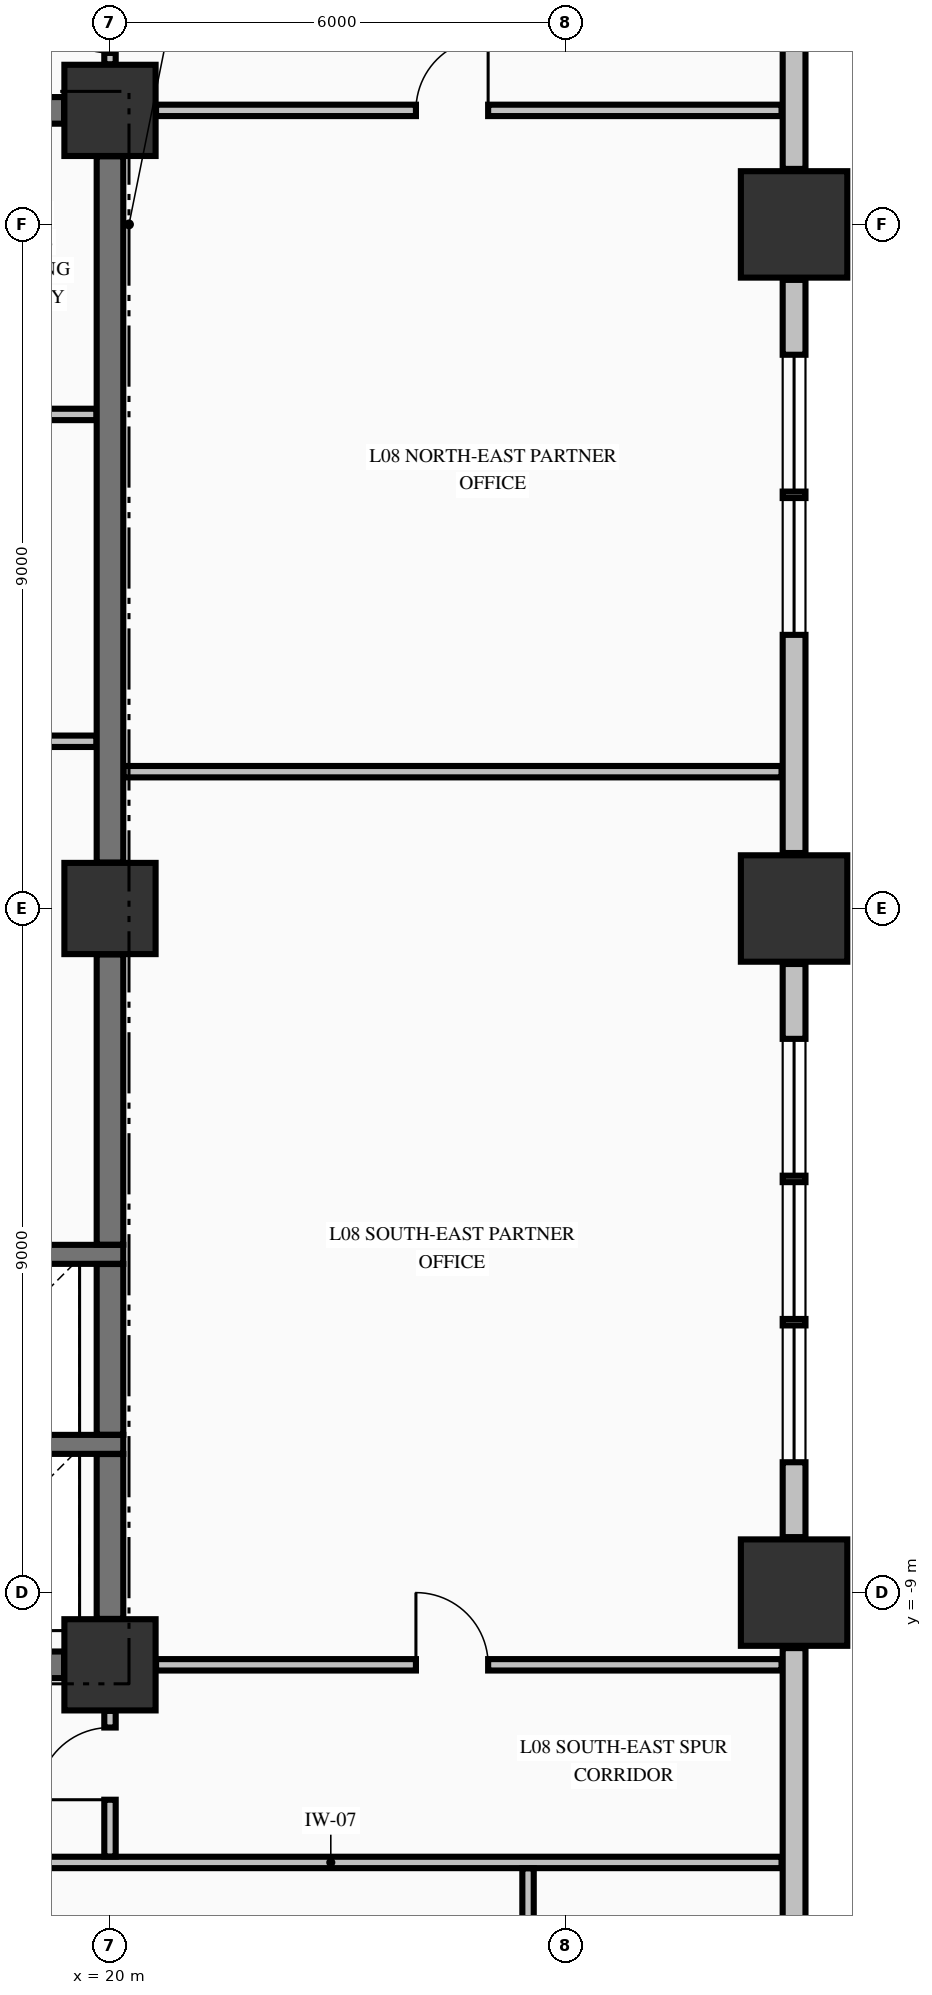
"""IFC4 building model, lengths in metres.
Left out: names, types, materials, properties, quantities, classifications, styles, units other than length and angle.
Written with IfcOpenShell. Run it as: python <this file> out.ifc"""

import sys

from ifc_helpers import new_model, si_unit, direction, frame, frame_2d, origin, origin_2d, place, context, subcontext, project, spatial, rectangle, extrude, element, fill, save


model = new_model("IFC4")
c1 = context("Model", 3, precision=1e-05, world=origin(), true_north=direction((0.0, 1.0)))
c2 = subcontext(c1, "Body", "Model", "MODEL_VIEW")
j1 = project(units=[si_unit("LENGTHUNIT", "METRE"), si_unit("PLANEANGLEUNIT", "RADIAN")], contexts=[c1])
p1 = place(None, origin())
s1 = spatial("IfcSite", under=j1, at=p1, CompositionType="ELEMENT")
p2 = place(p1, origin())
s2 = spatial("IfcBuilding", under=s1, at=p2, CompositionType="ELEMENT")
p3 = place(p2, frame((0.0, 0.0, 37.91)))
s3 = spatial("IfcBuildingStorey", under=s2, at=p3, CompositionType="ELEMENT", Elevation=37.91)
for number, where, z_axis, x_axis in (
    (1, (29.0, -9.0, -0.25), (0.0, 0.0, 1.0), (1.0, 0.0, 0.0)),
    (2, (29.0, 0.0, -0.25), (0.0, 0.0, 1.0), (1.0, 0.0, 0.0)),
    (3, (29.0, 9.0, -0.25), (0.0, 0.0, 1.0), (1.0, 0.0, 0.0)),
):
    element("IfcColumn", number, at=place(p3, frame(where, z_axis=z_axis, x_axis=x_axis)), inside=s3, PredefinedType="COLUMN", context=c2, shape_type="SweptSolid", body=[
        extrude(rectangle(XDim=1.4, YDim=1.4, at=origin_2d()), origin(), (0.0, 0.0, 1.0), 3.57),
    ])
for number, where, z_axis, x_axis in (
    (4, (20.0, -9.95, -0.25), (0.0, 0.0, 1.0), (1.0, 0.0, 0.0)),
    (5, (20.0, 10.5, -0.25), (0.0, 0.0, 1.0), (1.0, 0.0, 0.0)),
    (6, (20.0, 0.0, -0.25), (0.0, 0.0, 1.0), (1.0, 0.0, 0.0)),
):
    element("IfcColumn", number, at=place(p3, frame(where, z_axis=z_axis, x_axis=x_axis)), inside=s3, PredefinedType="COLUMN", context=c2, shape_type="SweptSolid", body=[
        extrude(rectangle(XDim=1.2, YDim=1.2, at=origin_2d()), origin(), (0.0, 0.0, 1.0), 3.57),
    ])
p4 = place(p3, frame((29.0, -22.27, 0.0), z_axis=(0.0, 0.0, 1.0), x_axis=(0.0, 1.0, 0.0)))
e7 = element("IfcWall", 7, at=p4, inside=s3, PredefinedType="STANDARD", context=c2, shape_type="SweptSolid", body=[
    extrude(rectangle(XDim=12.54, YDim=0.3, at=frame_2d((6.27, 0.0))), origin(), (0.0, 0.0, 1.0), 2.712),
])
p5 = place(p3, frame((29.0, -8.27, 0.0), z_axis=(0.0, 0.0, 1.0), x_axis=(0.0, 1.0, 0.0)))
e8 = element("IfcWall", 8, at=p5, inside=s3, PredefinedType="STANDARD", context=c2, shape_type="SweptSolid", body=[
    extrude(rectangle(XDim=7.54, YDim=0.3, at=frame_2d((3.77, 0.0))), origin(), (0.0, 0.0, 1.0), 2.712),
])
p6 = place(p5, frame((0.985, 0.0, 0.78)))
e9 = element("IfcOpeningElement", 9, at=p6, cuts=e8, PredefinedType="OPENING", context=c2, shape_type="SweptSolid", body=[
    extrude(rectangle(XDim=1.8, YDim=1.72, at=frame_2d((0.9, 0.86))), frame((0.0, 0.16, 0.0), z_axis=(0.0, -1.0, 0.0), x_axis=(1.0, 0.0, 0.0)), (0.0, 0.0, 1.0), 0.32),
])
p7 = place(p5, frame((2.87, 0.0, 0.78)))
e10 = element("IfcOpeningElement", 10, at=p7, cuts=e8, PredefinedType="OPENING", context=c2, shape_type="SweptSolid", body=[
    extrude(rectangle(XDim=1.8, YDim=1.72, at=frame_2d((0.9, 0.86))), frame((0.0, 0.16, 0.0), z_axis=(0.0, -1.0, 0.0), x_axis=(1.0, 0.0, 0.0)), (0.0, 0.0, 1.0), 0.32),
])
p8 = place(p5, frame((4.755, 0.0, 0.78)))
e11 = element("IfcOpeningElement", 11, at=p8, cuts=e8, PredefinedType="OPENING", context=c2, shape_type="SweptSolid", body=[
    extrude(rectangle(XDim=1.8, YDim=1.72, at=frame_2d((0.9, 0.86))), frame((0.0, 0.16, 0.0), z_axis=(0.0, -1.0, 0.0), x_axis=(1.0, 0.0, 0.0)), (0.0, 0.0, 1.0), 0.32),
])
p9 = place(p3, frame((29.0, 0.73, 0.0), z_axis=(0.0, 0.0, 1.0), x_axis=(0.0, 1.0, 0.0)))
e12 = element("IfcWall", 12, at=p9, inside=s3, PredefinedType="STANDARD", context=c2, shape_type="SweptSolid", body=[
    extrude(rectangle(XDim=7.54, YDim=0.3, at=frame_2d((3.77, 0.0))), origin(), (0.0, 0.0, 1.0), 2.712),
])
p10 = place(p9, frame((2.87, 0.0, 0.78)))
e13 = element("IfcOpeningElement", 13, at=p10, cuts=e12, PredefinedType="OPENING", context=c2, shape_type="SweptSolid", body=[
    extrude(rectangle(XDim=1.8, YDim=1.72, at=frame_2d((0.9, 0.86))), frame((0.0, 0.16, 0.0), z_axis=(0.0, -1.0, 0.0), x_axis=(1.0, 0.0, 0.0)), (0.0, 0.0, 1.0), 0.32),
])
p11 = place(p9, frame((4.755, 0.0, 0.78)))
e14 = element("IfcOpeningElement", 14, at=p11, cuts=e12, PredefinedType="OPENING", context=c2, shape_type="SweptSolid", body=[
    extrude(rectangle(XDim=1.8, YDim=1.72, at=frame_2d((0.9, 0.86))), frame((0.0, 0.16, 0.0), z_axis=(0.0, -1.0, 0.0), x_axis=(1.0, 0.0, 0.0)), (0.0, 0.0, 1.0), 0.32),
])
p12 = place(p3, frame((29.0, 9.73, 0.0), z_axis=(0.0, 0.0, 1.0), x_axis=(0.0, 1.0, 0.0)))
e15 = element("IfcWall", 15, at=p12, inside=s3, PredefinedType="STANDARD", context=c2, shape_type="SweptSolid", body=[
    extrude(rectangle(XDim=12.54, YDim=0.3, at=frame_2d((6.27, 0.0))), origin(), (0.0, 0.0, 1.0), 2.712),
])
p13 = place(p3, frame((14.7, -9.95, 0.0), z_axis=(0.0, 0.0, 1.0), x_axis=(1.0, 0.0, 0.0)))
e16 = element("IfcWall", 16, at=p13, inside=s3, PredefinedType="SHEAR", context=c2, shape_type="SweptSolid", body=[
    extrude(rectangle(XDim=4.696, YDim=0.35, at=frame_2d((2.348, 0.0))), origin(), (0.0, 0.0, 1.0), 3.32),
])
p14 = place(p13, frame((0.775, 0.0, 0.0)))
e17 = element("IfcOpeningElement", 17, at=p14, cuts=e16, PredefinedType="OPENING", context=c2, shape_type="SweptSolid", body=[
    extrude(rectangle(XDim=0.95, YDim=2.15, at=frame_2d((0.475, 1.075))), frame((0.0, 0.185, 0.0), z_axis=(0.0, -1.0, 0.0), x_axis=(1.0, 0.0, 0.0)), (0.0, 0.0, 1.0), 0.37),
])
for number, where, z_axis, x_axis in (
    (18, (17.025, -7.05, 0.0), (0.0, 0.0, 1.0), (1.0, 0.0, 0.0)),
    (19, (17.025, -4.55, 0.0), (0.0, 0.0, 1.0), (1.0, 0.0, 0.0)),
):
    element("IfcWall", number, at=place(p3, frame(where, z_axis=z_axis, x_axis=x_axis)), inside=s3, PredefinedType="SOLIDWALL", context=c2, shape_type="SweptSolid", body=[
        extrude(rectangle(XDim=3.15, YDim=0.25, at=frame_2d((1.575, 0.0))), origin(), (0.0, 0.0, 1.0), 3.32),
    ])
p15 = place(p3, frame((14.7, 10.5, 0.0), z_axis=(0.0, 0.0, 1.0), x_axis=(1.0, 0.0, 0.0)))
e20 = element("IfcWall", 20, at=p15, inside=s3, PredefinedType="SHEAR", context=c2, shape_type="SweptSolid", body=[
    extrude(rectangle(XDim=4.696, YDim=0.35, at=frame_2d((2.348, 0.0))), origin(), (0.0, 0.0, 1.0), 3.32),
])
p16 = place(p15, frame((0.6, 0.0, 0.0)))
e21 = element("IfcOpeningElement", 21, at=p16, cuts=e20, PredefinedType="OPENING", context=c2, shape_type="SweptSolid", body=[
    extrude(rectangle(XDim=0.9, YDim=2.15, at=frame_2d((0.45, 1.075))), frame((0.0, 0.185, 0.0), z_axis=(0.0, -1.0, 0.0), x_axis=(1.0, 0.0, 0.0)), (0.0, 0.0, 1.0), 0.37),
])
p17 = place(p3, frame((-23.835, -12.55, 0.0), z_axis=(0.0, 0.0, 1.0), x_axis=(1.0, 0.0, 0.0)))
e22 = element("IfcWall", 22, at=p17, inside=s3, PredefinedType="PARTITIONING", context=c2, shape_type="SweptSolid", body=[
    extrude(rectangle(XDim=52.67, YDim=0.15, at=frame_2d((26.335, 0.0))), origin(), (0.0, 0.0, 1.0), 3.32),
])
p18 = place(p17, frame((5.51, 0.0, 0.0)))
e23 = element("IfcOpeningElement", 23, at=p18, cuts=e22, PredefinedType="OPENING", context=c2, shape_type="SweptSolid", body=[
    extrude(rectangle(XDim=0.95, YDim=2.15, at=frame_2d((0.475, 1.075))), frame((0.0, 0.085, 0.0), z_axis=(0.0, -1.0, 0.0), x_axis=(1.0, 0.0, 0.0)), (0.0, 0.0, 1.0), 0.17),
])
p19 = place(p17, frame((12.81, 0.0, 0.0)))
e24 = element("IfcOpeningElement", 24, at=p19, cuts=e22, PredefinedType="OPENING", context=c2, shape_type="SweptSolid", body=[
    extrude(rectangle(XDim=0.95, YDim=2.15, at=frame_2d((0.475, 1.075))), frame((0.0, 0.085, 0.0), z_axis=(0.0, -1.0, 0.0), x_axis=(1.0, 0.0, 0.0)), (0.0, 0.0, 1.0), 0.17),
])
p20 = place(p17, frame((19.01, 0.0, 0.0)))
e25 = element("IfcOpeningElement", 25, at=p20, cuts=e22, PredefinedType="OPENING", context=c2, shape_type="SweptSolid", body=[
    extrude(rectangle(XDim=1.05, YDim=2.15, at=frame_2d((0.525, 1.075))), frame((0.0, 0.085, 0.0), z_axis=(0.0, -1.0, 0.0), x_axis=(1.0, 0.0, 0.0)), (0.0, 0.0, 1.0), 0.17),
])
p21 = place(p17, frame((27.06, 0.0, 0.0)))
e26 = element("IfcOpeningElement", 26, at=p21, cuts=e22, PredefinedType="OPENING", context=c2, shape_type="SweptSolid", body=[
    extrude(rectangle(XDim=0.95, YDim=2.15, at=frame_2d((0.475, 1.075))), frame((0.0, 0.085, 0.0), z_axis=(0.0, -1.0, 0.0), x_axis=(1.0, 0.0, 0.0)), (0.0, 0.0, 1.0), 0.17),
])
p22 = place(p17, frame((34.81, 0.0, 0.0)))
e27 = element("IfcOpeningElement", 27, at=p22, cuts=e22, PredefinedType="OPENING", context=c2, shape_type="SweptSolid", body=[
    extrude(rectangle(XDim=0.95, YDim=2.15, at=frame_2d((0.475, 1.075))), frame((0.0, 0.085, 0.0), z_axis=(0.0, -1.0, 0.0), x_axis=(1.0, 0.0, 0.0)), (0.0, 0.0, 1.0), 0.17),
])
p23 = place(p17, frame((39.76, 0.0, 0.0)))
e28 = element("IfcOpeningElement", 28, at=p23, cuts=e22, PredefinedType="OPENING", context=c2, shape_type="SweptSolid", body=[
    extrude(rectangle(XDim=1.05, YDim=2.15, at=frame_2d((0.525, 1.075))), frame((0.0, 0.085, 0.0), z_axis=(0.0, -1.0, 0.0), x_axis=(1.0, 0.0, 0.0)), (0.0, 0.0, 1.0), 0.17),
])
p24 = place(p3, frame((20.606, -9.95, 0.0), z_axis=(0.0, 0.0, 1.0), x_axis=(1.0, 0.0, 0.0)))
e29 = element("IfcWall", 29, at=p24, inside=s3, PredefinedType="PARTITIONING", context=c2, shape_type="SweptSolid", body=[
    extrude(rectangle(XDim=8.229, YDim=0.15, at=frame_2d((4.115, 0.0))), origin(), (0.0, 0.0, 1.0), 3.32),
])
p25 = place(p24, frame((3.419, 0.0, 0.0)))
e30 = element("IfcOpeningElement", 30, at=p25, cuts=e29, PredefinedType="OPENING", context=c2, shape_type="SweptSolid", body=[
    extrude(rectangle(XDim=0.95, YDim=2.15, at=frame_2d((0.475, 1.075))), frame((0.0, 0.085, 0.0), z_axis=(0.0, -1.0, 0.0), x_axis=(1.0, 0.0, 0.0)), (0.0, 0.0, 1.0), 0.17),
])
p26 = place(p3, frame((20.178, 1.8, 0.0), z_axis=(0.0, 0.0, 1.0), x_axis=(1.0, 0.0, 0.0)))
e31 = element("IfcWall", 31, at=p26, inside=s3, PredefinedType="PARTITIONING", context=c2, shape_type="SweptSolid", body=[
    extrude(rectangle(XDim=8.657, YDim=0.15, at=frame_2d((4.329, 0.0))), origin(), (0.0, 0.0, 1.0), 3.32),
])
p27 = place(p3, frame((14.878, 2.2, 0.0), z_axis=(0.0, 0.0, 1.0), x_axis=(1.0, 0.0, 0.0)))
e32 = element("IfcWall", 32, at=p27, inside=s3, PredefinedType="PARTITIONING", context=c2, shape_type="SweptSolid", body=[
    extrude(rectangle(XDim=4.944, YDim=0.15, at=frame_2d((2.472, 0.0))), origin(), (0.0, 0.0, 1.0), 3.32),
])
p28 = place(p27, frame((0.397, 0.0, 0.0)))
e33 = element("IfcOpeningElement", 33, at=p28, cuts=e32, PredefinedType="OPENING", context=c2, shape_type="SweptSolid", body=[
    extrude(rectangle(XDim=0.95, YDim=2.15, at=frame_2d((0.475, 1.075))), frame((0.0, 0.085, 0.0), z_axis=(0.0, -1.0, 0.0), x_axis=(1.0, 0.0, 0.0)), (0.0, 0.0, 1.0), 0.17),
])
p29 = place(p3, frame((14.878, 6.5, 0.0), z_axis=(0.0, 0.0, 1.0), x_axis=(1.0, 0.0, 0.0)))
e34 = element("IfcWall", 34, at=p29, inside=s3, PredefinedType="PARTITIONING", context=c2, shape_type="SweptSolid", body=[
    extrude(rectangle(XDim=4.944, YDim=0.15, at=frame_2d((2.472, 0.0))), origin(), (0.0, 0.0, 1.0), 3.32),
])
p30 = place(p29, frame((0.397, 0.0, 0.0)))
e35 = element("IfcOpeningElement", 35, at=p30, cuts=e34, PredefinedType="OPENING", context=c2, shape_type="SweptSolid", body=[
    extrude(rectangle(XDim=0.95, YDim=2.15, at=frame_2d((0.475, 1.075))), frame((0.0, 0.085, 0.0), z_axis=(0.0, -1.0, 0.0), x_axis=(1.0, 0.0, 0.0)), (0.0, 0.0, 1.0), 0.17),
])
p31 = place(p29, frame((3.047, 0.0, 0.0)))
e36 = element("IfcOpeningElement", 36, at=p31, cuts=e34, PredefinedType="OPENING", context=c2, shape_type="SweptSolid", body=[
    extrude(rectangle(XDim=0.95, YDim=2.15, at=frame_2d((0.475, 1.075))), frame((0.0, 0.085, 0.0), z_axis=(0.0, -1.0, 0.0), x_axis=(1.0, 0.0, 0.0)), (0.0, 0.0, 1.0), 0.17),
])
p32 = place(p3, frame((20.606, 10.5, 0.0), z_axis=(0.0, 0.0, 1.0), x_axis=(1.0, 0.0, 0.0)))
e37 = element("IfcWall", 37, at=p32, inside=s3, PredefinedType="PARTITIONING", context=c2, shape_type="SweptSolid", body=[
    extrude(rectangle(XDim=8.229, YDim=0.15, at=frame_2d((4.115, 0.0))), origin(), (0.0, 0.0, 1.0), 3.32),
])
p33 = place(p32, frame((3.419, 0.0, 0.0)))
e38 = element("IfcOpeningElement", 38, at=p33, cuts=e37, PredefinedType="OPENING", context=c2, shape_type="SweptSolid", body=[
    extrude(rectangle(XDim=0.95, YDim=2.15, at=frame_2d((0.475, 1.075))), frame((0.0, 0.085, 0.0), z_axis=(0.0, -1.0, 0.0), x_axis=(1.0, 0.0, 0.0)), (0.0, 0.0, 1.0), 0.17),
])
p34 = place(p3, frame((20.0, -9.346, 0.0), z_axis=(0.0, 0.0, 1.0), x_axis=(0.0, 1.0, 0.0)))
e39 = element("IfcWall", 39, at=p34, inside=s3, PredefinedType="SHEAR", context=c2, shape_type="SweptSolid", body=[
    extrude(rectangle(XDim=2.169, YDim=0.35, at=frame_2d((1.084, 0.0))), origin(), (0.0, 0.0, 1.0), 3.32),
])
p35 = place(p3, frame((20.0, -6.923, 0.0), z_axis=(0.0, 0.0, 1.0), x_axis=(0.0, 1.0, 0.0)))
e40 = element("IfcWall", 40, at=p35, inside=s3, PredefinedType="SHEAR", context=c2, shape_type="SweptSolid", body=[
    extrude(rectangle(XDim=2.246, YDim=0.35, at=frame_2d((1.123, 0.0))), origin(), (0.0, 0.0, 1.0), 3.32),
])
p36 = place(p3, frame((20.0, -4.423, 0.0), z_axis=(0.0, 0.0, 1.0), x_axis=(0.0, 1.0, 0.0)))
e41 = element("IfcWall", 41, at=p36, inside=s3, PredefinedType="SHEAR", context=c2, shape_type="SweptSolid", body=[
    extrude(rectangle(XDim=3.819, YDim=0.35, at=frame_2d((1.91, 0.0))), origin(), (0.0, 0.0, 1.0), 3.32),
])
p37 = place(p3, frame((20.0, 0.604, 0.0), z_axis=(0.0, 0.0, 1.0), x_axis=(0.0, 1.0, 0.0)))
e42 = element("IfcWall", 42, at=p37, inside=s3, PredefinedType="SHEAR", context=c2, shape_type="SweptSolid", body=[
    extrude(rectangle(XDim=9.292, YDim=0.35, at=frame_2d((4.646, 0.0))), origin(), (0.0, 0.0, 1.0), 3.32),
])
p38 = place(p3, frame((20.0, -12.472, 0.0), z_axis=(0.0, 0.0, 1.0), x_axis=(0.0, 1.0, 0.0)))
e43 = element("IfcWall", 43, at=p38, inside=s3, PredefinedType="PARTITIONING", context=c2, shape_type="SweptSolid", body=[
    extrude(rectangle(XDim=1.916, YDim=0.15, at=frame_2d((0.958, 0.0))), origin(), (0.0, 0.0, 1.0), 2.66),
])
p39 = place(p38, frame((0.747, 0.0, 0.0)))
e44 = element("IfcOpeningElement", 44, at=p39, cuts=e43, PredefinedType="OPENING", context=c2, shape_type="SweptSolid", body=[
    extrude(rectangle(XDim=0.95, YDim=2.15, at=frame_2d((0.475, 1.075))), frame((0.0, 0.085, 0.0), z_axis=(0.0, -1.0, 0.0), x_axis=(1.0, 0.0, 0.0)), (0.0, 0.0, 1.0), 0.17),
])
p40 = place(p3, frame((20.0, 11.106, 0.0), z_axis=(0.0, 0.0, 1.0), x_axis=(0.0, 1.0, 0.0)))
e45 = element("IfcWall", 45, at=p40, inside=s3, PredefinedType="PARTITIONING", context=c2, shape_type="SweptSolid", body=[
    extrude(rectangle(XDim=1.566, YDim=0.15, at=frame_2d((0.783, 0.0))), origin(), (0.0, 0.0, 1.0), 2.66),
])
p41 = place(p40, frame((0.15, 0.0, 0.0)))
e46 = element("IfcOpeningElement", 46, at=p41, cuts=e45, PredefinedType="OPENING", context=c2, shape_type="SweptSolid", body=[
    extrude(rectangle(XDim=0.95, YDim=2.15, at=frame_2d((0.475, 1.075))), frame((0.0, 0.085, 0.0), z_axis=(0.0, -1.0, 0.0), x_axis=(1.0, 0.0, 0.0)), (0.0, 0.0, 1.0), 0.17),
])
p42 = place(p3, frame((25.5, -22.294, 0.0), z_axis=(0.0, 0.0, 1.0), x_axis=(0.0, 1.0, 0.0)))
e47 = element("IfcWall", 47, at=p42, inside=s3, PredefinedType="PARTITIONING", context=c2, shape_type="SweptSolid", body=[
    extrude(rectangle(XDim=9.666, YDim=0.15, at=frame_2d((4.833, 0.0))), origin(), (0.0, 0.0, 1.0), 3.32),
])
p43 = place(p6, origin())
e48 = element("IfcWindow", 48, at=p43, inside=s3, PartitioningType="SINGLE_PANEL", PredefinedType="WINDOW", context=c2, shape_type="SweptSolid", body=[
    extrude(rectangle(XDim=1.8, YDim=1.72, at=frame_2d((0.9, 0.86))), frame((0.0, 0.03, 0.0), z_axis=(0.0, -1.0, 0.0), x_axis=(1.0, 0.0, 0.0)), (0.0, 0.0, 1.0), 0.06),
])
fill(e9, e48)
p44 = place(p7, origin())
e49 = element("IfcWindow", 49, at=p44, inside=s3, PartitioningType="SINGLE_PANEL", PredefinedType="WINDOW", context=c2, shape_type="SweptSolid", body=[
    extrude(rectangle(XDim=1.8, YDim=1.72, at=frame_2d((0.9, 0.86))), frame((0.0, 0.03, 0.0), z_axis=(0.0, -1.0, 0.0), x_axis=(1.0, 0.0, 0.0)), (0.0, 0.0, 1.0), 0.06),
])
fill(e10, e49)
p45 = place(p8, origin())
e50 = element("IfcWindow", 50, at=p45, inside=s3, PartitioningType="SINGLE_PANEL", PredefinedType="WINDOW", context=c2, shape_type="SweptSolid", body=[
    extrude(rectangle(XDim=1.8, YDim=1.72, at=frame_2d((0.9, 0.86))), frame((0.0, 0.03, 0.0), z_axis=(0.0, -1.0, 0.0), x_axis=(1.0, 0.0, 0.0)), (0.0, 0.0, 1.0), 0.06),
])
fill(e11, e50)
p46 = place(p10, origin())
e51 = element("IfcWindow", 51, at=p46, inside=s3, PartitioningType="SINGLE_PANEL", PredefinedType="WINDOW", context=c2, shape_type="SweptSolid", body=[
    extrude(rectangle(XDim=1.8, YDim=1.72, at=frame_2d((0.9, 0.86))), frame((0.0, 0.03, 0.0), z_axis=(0.0, -1.0, 0.0), x_axis=(1.0, 0.0, 0.0)), (0.0, 0.0, 1.0), 0.06),
])
fill(e13, e51)
p47 = place(p11, origin())
e52 = element("IfcWindow", 52, at=p47, inside=s3, PartitioningType="SINGLE_PANEL", PredefinedType="WINDOW", context=c2, shape_type="SweptSolid", body=[
    extrude(rectangle(XDim=1.8, YDim=1.72, at=frame_2d((0.9, 0.86))), frame((0.0, 0.03, 0.0), z_axis=(0.0, -1.0, 0.0), x_axis=(1.0, 0.0, 0.0)), (0.0, 0.0, 1.0), 0.06),
])
fill(e14, e52)
p48 = place(p41, origin())
e53 = element("IfcDoor", 53, at=p48, inside=s3, OperationType="SINGLE_SWING_RIGHT", PredefinedType="DOOR", context=c2, shape_type="SweptSolid", body=[
    extrude(rectangle(XDim=0.95, YDim=2.15, at=frame_2d((0.475, 1.075))), frame((0.0, 0.025, 0.0), z_axis=(0.0, -1.0, 0.0), x_axis=(1.0, 0.0, 0.0)), (0.0, 0.0, 1.0), 0.05),
])
fill(e46, e53)
p49 = place(p39, origin())
e54 = element("IfcDoor", 54, at=p49, inside=s3, OperationType="SINGLE_SWING_LEFT", PredefinedType="DOOR", context=c2, shape_type="SweptSolid", body=[
    extrude(rectangle(XDim=0.95, YDim=2.15, at=frame_2d((0.475, 1.075))), frame((0.0, 0.025, 0.0), z_axis=(0.0, -1.0, 0.0), x_axis=(1.0, 0.0, 0.0)), (0.0, 0.0, 1.0), 0.05),
])
fill(e44, e54)
p50 = place(p33, origin())
e55 = element("IfcDoor", 55, at=p50, inside=s3, OperationType="SINGLE_SWING_RIGHT", PredefinedType="DOOR", context=c2, shape_type="SweptSolid", body=[
    extrude(rectangle(XDim=0.95, YDim=2.15, at=frame_2d((0.475, 1.075))), frame((0.0, 0.025, 0.0), z_axis=(0.0, -1.0, 0.0), x_axis=(1.0, 0.0, 0.0)), (0.0, 0.0, 1.0), 0.05),
])
fill(e38, e55)
p51 = place(p25, origin())
e56 = element("IfcDoor", 56, at=p51, inside=s3, OperationType="SINGLE_SWING_LEFT", PredefinedType="DOOR", context=c2, shape_type="SweptSolid", body=[
    extrude(rectangle(XDim=0.95, YDim=2.15, at=frame_2d((0.475, 1.075))), frame((0.0, 0.025, 0.0), z_axis=(0.0, -1.0, 0.0), x_axis=(1.0, 0.0, 0.0)), (0.0, 0.0, 1.0), 0.05),
])
fill(e30, e56)
save(model, sys.argv[1])
